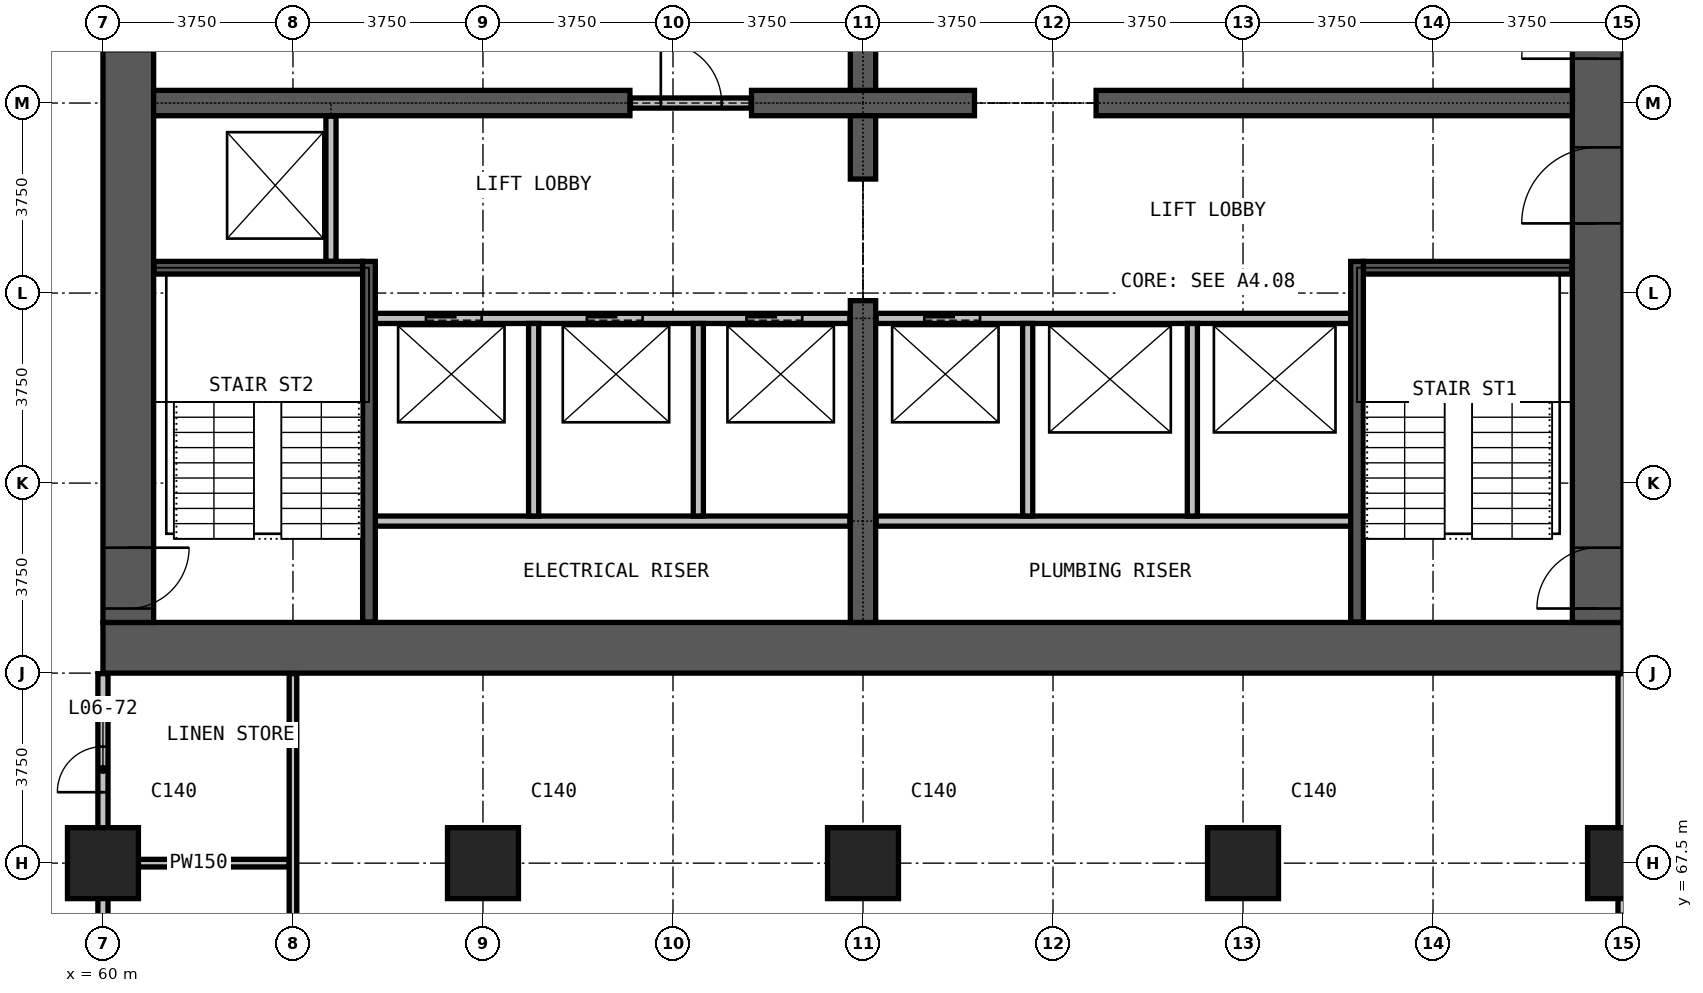
"""IFC4 building model, lengths in metres.
Left out: names, types, materials, properties, quantities, classifications, styles, units other than length and angle.
Written with IfcOpenShell. Run it as: python <this file> out.ifc"""

import sys

from ifc_helpers import new_model, si_unit, direction, frame, frame_2d, origin, origin_2d, place, context, subcontext, project, spatial, rectangle, extrude, element, fill, save


model = new_model("IFC4")
c1 = context("Model", 3, precision=1e-05, world=origin(), true_north=direction((0.0, 1.0)))
c2 = subcontext(c1, "Body", "Model", "MODEL_VIEW")
j1 = project(units=[si_unit("LENGTHUNIT", "METRE"), si_unit("PLANEANGLEUNIT", "RADIAN")], contexts=[c1])
p1 = place(None, origin())
s1 = spatial("IfcSite", under=j1, at=p1, CompositionType="ELEMENT")
p2 = place(p1, origin())
s2 = spatial("IfcBuilding", under=s1, at=p2, CompositionType="ELEMENT")
p3 = place(p2, frame((0.0, 0.0, 39.5)))
s3 = spatial("IfcBuildingStorey", under=s2, at=p3, CompositionType="ELEMENT", Elevation=39.5)
for number, where, z_axis, x_axis in (
    (1, (60.0, 67.5, 0.0), (0.0, 0.0, 1.0), (1.0, 0.0, 0.0)),
    (2, (67.5, 67.5, 0.0), (0.0, 0.0, 1.0), (1.0, 0.0, 0.0)),
    (3, (75.0, 67.5, 0.0), (0.0, 0.0, 1.0), (1.0, 0.0, 0.0)),
    (4, (82.5, 67.5, 0.0), (0.0, 0.0, 1.0), (1.0, 0.0, 0.0)),
    (5, (90.0, 67.5, 0.0), (0.0, 0.0, 1.0), (1.0, 0.0, 0.0)),
):
    element("IfcColumn", number, at=place(p3, frame(where, z_axis=z_axis, x_axis=x_axis)), inside=s3, PredefinedType="COLUMN", context=c2, shape_type="SweptSolid", body=[
        extrude(rectangle(XDim=1.4, YDim=1.4, at=origin_2d()), origin(), (0.0, 0.0, 1.0), 3.3),
    ])
p4 = place(p3, frame((60.0, 71.75, 0.0), z_axis=(0.0, 0.0, 1.0), x_axis=(1.0, 0.0, 0.0)))
e6 = element("IfcWall", 6, at=p4, inside=s3, PredefinedType="SHEAR", context=c2, shape_type="SweptSolid", body=[
    extrude(rectangle(XDim=30.0, YDim=1.0, at=frame_2d((15.0, 0.0))), origin(), (0.0, 0.0, 1.0), 3.3),
])
p5 = place(p3, frame((89.5, 72.25, 0.0), z_axis=(0.0, 0.0, 1.0), x_axis=(0.0, 1.0, 0.0)))
e7 = element("IfcWall", 7, at=p5, inside=s3, PredefinedType="SHEAR", context=c2, shape_type="SweptSolid", body=[
    extrude(rectangle(XDim=20.5, YDim=1.0, at=frame_2d((10.25, 0.0))), origin(), (0.0, 0.0, 1.0), 3.3),
])
p6 = place(p5, frame((0.275, 0.0, 0.0)))
e8 = element("IfcOpeningElement", 8, at=p6, cuts=e7, PredefinedType="OPENING", context=c2, shape_type="SweptSolid", body=[
    extrude(rectangle(XDim=1.2, YDim=2.2, at=frame_2d((0.6, 1.1))), frame((0.0, 0.51, 0.0), z_axis=(0.0, -1.0, 0.0), x_axis=(1.0, 0.0, 0.0)), (0.0, 0.0, 1.0), 1.02),
])
p7 = place(p5, frame((13.775, 0.0, 0.0)))
e9 = element("IfcOpeningElement", 9, at=p7, cuts=e7, PredefinedType="OPENING", context=c2, shape_type="SweptSolid", body=[
    extrude(rectangle(XDim=1.2, YDim=2.2, at=frame_2d((0.6, 1.1))), frame((0.0, 0.51, 0.0), z_axis=(0.0, -1.0, 0.0), x_axis=(1.0, 0.0, 0.0)), (0.0, 0.0, 1.0), 1.02),
])
p8 = place(p5, frame((7.875, 0.0, 0.0)))
e10 = element("IfcOpeningElement", 10, at=p8, cuts=e7, PredefinedType="OPENING", context=c2, shape_type="SweptSolid", body=[
    extrude(rectangle(XDim=1.5, YDim=2.2, at=frame_2d((0.75, 1.1))), frame((0.0, 0.51, 0.0), z_axis=(0.0, -1.0, 0.0), x_axis=(1.0, 0.0, 0.0)), (0.0, 0.0, 1.0), 1.02),
])
p9 = place(p5, frame((11.125, 0.0, 0.0)))
e11 = element("IfcOpeningElement", 11, at=p9, cuts=e7, PredefinedType="OPENING", context=c2, shape_type="SweptSolid", body=[
    extrude(rectangle(XDim=1.5, YDim=2.2, at=frame_2d((0.75, 1.1))), frame((0.0, 0.51, 0.0), z_axis=(0.0, -1.0, 0.0), x_axis=(1.0, 0.0, 0.0)), (0.0, 0.0, 1.0), 1.02),
])
p10 = place(p3, frame((60.5, 92.75, 0.0), z_axis=(0.0, 0.0, 1.0), x_axis=(0.0, -1.0, 0.0)))
e12 = element("IfcWall", 12, at=p10, inside=s3, PredefinedType="SHEAR", context=c2, shape_type="SweptSolid", body=[
    extrude(rectangle(XDim=20.5, YDim=1.0, at=frame_2d((10.25, 0.0))), origin(), (0.0, 0.0, 1.0), 3.3),
])
p11 = place(p10, frame((19.025, 0.0, 0.0)))
e13 = element("IfcOpeningElement", 13, at=p11, cuts=e12, PredefinedType="OPENING", context=c2, shape_type="SweptSolid", body=[
    extrude(rectangle(XDim=1.2, YDim=2.2, at=frame_2d((0.6, 1.1))), frame((0.0, 0.51, 0.0), z_axis=(0.0, -1.0, 0.0), x_axis=(1.0, 0.0, 0.0)), (0.0, 0.0, 1.0), 1.02),
])
p12 = place(p10, frame((8.025, 0.0, 0.0)))
e14 = element("IfcOpeningElement", 14, at=p12, cuts=e12, PredefinedType="OPENING", context=c2, shape_type="SweptSolid", body=[
    extrude(rectangle(XDim=1.2, YDim=2.2, at=frame_2d((0.6, 1.1))), frame((0.0, 0.51, 0.0), z_axis=(0.0, -1.0, 0.0), x_axis=(1.0, 0.0, 0.0)), (0.0, 0.0, 1.0), 1.02),
])
p13 = place(p3, frame((61.0, 82.5, 0.0), z_axis=(0.0, 0.0, 1.0), x_axis=(1.0, 0.0, 0.0)))
e15 = element("IfcWall", 15, at=p13, inside=s3, PredefinedType="SHEAR", context=c2, shape_type="SweptSolid", body=[
    extrude(rectangle(XDim=9.4, YDim=0.5, at=frame_2d((4.7, 0.0))), origin(), (0.0, 0.0, 1.0), 3.3),
])
p14 = place(p3, frame((72.8, 82.5, 0.0), z_axis=(0.0, 0.0, 1.0), x_axis=(1.0, 0.0, 0.0)))
e16 = element("IfcWall", 16, at=p14, inside=s3, PredefinedType="SHEAR", context=c2, shape_type="SweptSolid", body=[
    extrude(rectangle(XDim=4.4, YDim=0.5, at=frame_2d((2.2, 0.0))), origin(), (0.0, 0.0, 1.0), 3.3),
])
p15 = place(p3, frame((79.6, 82.5, 0.0), z_axis=(0.0, 0.0, 1.0), x_axis=(1.0, 0.0, 0.0)))
e17 = element("IfcWall", 17, at=p15, inside=s3, PredefinedType="SHEAR", context=c2, shape_type="SweptSolid", body=[
    extrude(rectangle(XDim=9.4, YDim=0.5, at=frame_2d((4.7, 0.0))), origin(), (0.0, 0.0, 1.0), 3.3),
])
p16 = place(p3, frame((75.0, 72.25, 0.0), z_axis=(0.0, 0.0, 1.0), x_axis=(0.0, 1.0, 0.0)))
e18 = element("IfcWall", 18, at=p16, inside=s3, PredefinedType="SHEAR", context=c2, shape_type="SweptSolid", body=[
    extrude(rectangle(XDim=6.35, YDim=0.5, at=frame_2d((3.175, 0.0))), origin(), (0.0, 0.0, 1.0), 3.3),
])
for number, where, z_axis, x_axis in (
    (19, (75.0, 81.0, 0.0), (0.0, 0.0, 1.0), (0.0, 1.0, 0.0)),
    (20, (75.0, 82.75, 0.0), (0.0, 0.0, 1.0), (0.0, 1.0, 0.0)),
):
    element("IfcWall", number, at=place(p3, frame(where, z_axis=z_axis, x_axis=x_axis)), inside=s3, PredefinedType="SHEAR", context=c2, shape_type="SweptSolid", body=[
        extrude(rectangle(XDim=1.25, YDim=0.5, at=frame_2d((0.625, 0.0))), origin(), (0.0, 0.0, 1.0), 3.3),
    ])
p17 = place(p3, frame((70.41, 82.5, 0.0), z_axis=(0.0, 0.0, 1.0), x_axis=(1.0, 0.0, 0.0)))
e21 = element("IfcWall", 21, at=p17, inside=s3, PredefinedType="PARTITIONING", context=c2, shape_type="SweptSolid", body=[
    extrude(rectangle(XDim=2.38, YDim=0.2, at=frame_2d((1.19, 0.0))), origin(), (0.0, 0.0, 1.0), 2.4),
])
p18 = place(p17, frame((0.6, 0.0, 0.0)))
e22 = element("IfcOpeningElement", 22, at=p18, cuts=e21, PredefinedType="OPENING", context=c2, shape_type="SweptSolid", body=[
    extrude(rectangle(XDim=1.2, YDim=2.2, at=frame_2d((0.6, 1.1))), frame((0.0, 0.11, 0.0), z_axis=(0.0, -1.0, 0.0), x_axis=(1.0, 0.0, 0.0)), (0.0, 0.0, 1.0), 0.22),
])
p19 = place(p3, frame((60.0, 52.4, 0.0), z_axis=(0.0, 0.0, 1.0), x_axis=(0.0, 1.0, 0.0)))
e23 = element("IfcWall", 23, at=p19, inside=s3, PredefinedType="PARTITIONING", context=c2, shape_type="SweptSolid", body=[
    extrude(rectangle(XDim=18.84, YDim=0.2, at=frame_2d((9.42, 0.0))), origin(), (0.0, 0.0, 1.0), 3.0),
])
p20 = place(p19, frame((3.35, 0.0, 0.0)))
e24 = element("IfcOpeningElement", 24, at=p20, cuts=e23, PredefinedType="OPENING", context=c2, shape_type="SweptSolid", body=[
    extrude(rectangle(XDim=1.0, YDim=2.2, at=frame_2d((0.5, 1.1))), frame((0.0, 0.11, 0.0), z_axis=(0.0, -1.0, 0.0), x_axis=(1.0, 0.0, 0.0)), (0.0, 0.0, 1.0), 0.22),
])
p21 = place(p19, frame((10.9, 0.0, 0.0)))
e25 = element("IfcOpeningElement", 25, at=p21, cuts=e23, PredefinedType="OPENING", context=c2, shape_type="SweptSolid", body=[
    extrude(rectangle(XDim=0.9, YDim=2.2, at=frame_2d((0.45, 1.1))), frame((0.0, 0.11, 0.0), z_axis=(0.0, -1.0, 0.0), x_axis=(1.0, 0.0, 0.0)), (0.0, 0.0, 1.0), 0.22),
])
p22 = place(p19, frame((16.5, 0.0, 0.0)))
e26 = element("IfcOpeningElement", 26, at=p22, cuts=e23, PredefinedType="OPENING", context=c2, shape_type="SweptSolid", body=[
    extrude(rectangle(XDim=0.9, YDim=2.2, at=frame_2d((0.45, 1.1))), frame((0.0, 0.11, 0.0), z_axis=(0.0, -1.0, 0.0), x_axis=(1.0, 0.0, 0.0)), (0.0, 0.0, 1.0), 0.22),
])
p23 = place(p3, frame((90.0, 52.4, 0.0), z_axis=(0.0, 0.0, 1.0), x_axis=(0.0, 1.0, 0.0)))
e27 = element("IfcWall", 27, at=p23, inside=s3, PredefinedType="PARTITIONING", context=c2, shape_type="SweptSolid", body=[
    extrude(rectangle(XDim=18.84, YDim=0.2, at=frame_2d((9.42, 0.0))), origin(), (0.0, 0.0, 1.0), 3.0),
])
p24 = place(p23, frame((3.35, 0.0, 0.0)))
e28 = element("IfcOpeningElement", 28, at=p24, cuts=e27, PredefinedType="OPENING", context=c2, shape_type="SweptSolid", body=[
    extrude(rectangle(XDim=1.0, YDim=2.2, at=frame_2d((0.5, 1.1))), frame((0.0, 0.11, 0.0), z_axis=(0.0, -1.0, 0.0), x_axis=(1.0, 0.0, 0.0)), (0.0, 0.0, 1.0), 0.22),
])
p25 = place(p23, frame((12.3, 0.0, 0.0)))
e29 = element("IfcOpeningElement", 29, at=p25, cuts=e27, PredefinedType="OPENING", context=c2, shape_type="SweptSolid", body=[
    extrude(rectangle(XDim=1.8, YDim=2.2, at=frame_2d((0.9, 1.1))), frame((0.0, 0.11, 0.0), z_axis=(0.0, -1.0, 0.0), x_axis=(1.0, 0.0, 0.0)), (0.0, 0.0, 1.0), 0.22),
])
p26 = place(p3, frame((60.1, 67.5, 0.0), z_axis=(0.0, 0.0, 1.0), x_axis=(1.0, 0.0, 0.0)))
e30 = element("IfcWall", 30, at=p26, inside=s3, PredefinedType="PARTITIONING", context=c2, shape_type="SweptSolid", body=[
    extrude(rectangle(XDim=3.575, YDim=0.15, at=frame_2d((1.788, 0.0))), origin(), (0.0, 0.0, 1.0), 3.0),
])
p27 = place(p3, frame((63.75, 60.075, 0.0), z_axis=(0.0, 0.0, 1.0), x_axis=(0.0, 1.0, 0.0)))
e31 = element("IfcWall", 31, at=p27, inside=s3, PredefinedType="PARTITIONING", context=c2, shape_type="SweptSolid", body=[
    extrude(rectangle(XDim=11.165, YDim=0.15, at=frame_2d((5.583, 0.0))), origin(), (0.0, 0.0, 1.0), 3.0),
])
for number, where, z_axis, x_axis in (
    (32, (65.375, 74.25, 0.0), (0.0, 0.0, 1.0), (1.0, 0.0, 0.0)),
    (33, (75.26, 74.25, 0.0), (0.0, 0.0, 1.0), (1.0, 0.0, 0.0)),
):
    element("IfcWall", number, at=place(p3, frame(where, z_axis=z_axis, x_axis=x_axis)), inside=s3, PredefinedType="PARTITIONING", context=c2, shape_type="SweptSolid", body=[
        extrude(rectangle(XDim=9.365, YDim=0.2, at=frame_2d((4.683, 0.0))), origin(), (0.0, 0.0, 1.0), 3.0),
    ])
p28 = place(p3, frame((65.375, 78.25, 0.0), z_axis=(0.0, 0.0, 1.0), x_axis=(1.0, 0.0, 0.0)))
e34 = element("IfcWall", 34, at=p28, inside=s3, PredefinedType="PARTITIONING", context=c2, shape_type="SweptSolid", body=[
    extrude(rectangle(XDim=9.365, YDim=0.2, at=frame_2d((4.683, 0.0))), origin(), (0.0, 0.0, 1.0), 3.0),
])
p29 = place(p28, frame((1.0, 0.0, 0.0)))
e35 = element("IfcOpeningElement", 35, at=p29, cuts=e34, PredefinedType="OPENING", context=c2, shape_type="SweptSolid", body=[
    extrude(rectangle(XDim=1.1, YDim=2.2, at=frame_2d((0.55, 1.1))), frame((0.0, 0.11, 0.0), z_axis=(0.0, -1.0, 0.0), x_axis=(1.0, 0.0, 0.0)), (0.0, 0.0, 1.0), 0.22),
])
p30 = place(p28, frame((4.175, 0.0, 0.0)))
e36 = element("IfcOpeningElement", 36, at=p30, cuts=e34, PredefinedType="OPENING", context=c2, shape_type="SweptSolid", body=[
    extrude(rectangle(XDim=1.1, YDim=2.2, at=frame_2d((0.55, 1.1))), frame((0.0, 0.11, 0.0), z_axis=(0.0, -1.0, 0.0), x_axis=(1.0, 0.0, 0.0)), (0.0, 0.0, 1.0), 0.22),
])
p31 = place(p28, frame((7.325, 0.0, 0.0)))
e37 = element("IfcOpeningElement", 37, at=p31, cuts=e34, PredefinedType="OPENING", context=c2, shape_type="SweptSolid", body=[
    extrude(rectangle(XDim=1.1, YDim=2.2, at=frame_2d((0.55, 1.1))), frame((0.0, 0.11, 0.0), z_axis=(0.0, -1.0, 0.0), x_axis=(1.0, 0.0, 0.0)), (0.0, 0.0, 1.0), 0.22),
])
p32 = place(p3, frame((75.26, 78.25, 0.0), z_axis=(0.0, 0.0, 1.0), x_axis=(1.0, 0.0, 0.0)))
e38 = element("IfcWall", 38, at=p32, inside=s3, PredefinedType="PARTITIONING", context=c2, shape_type="SweptSolid", body=[
    extrude(rectangle(XDim=9.365, YDim=0.2, at=frame_2d((4.683, 0.0))), origin(), (0.0, 0.0, 1.0), 3.0),
])
p33 = place(p32, frame((0.95, 0.0, 0.0)))
e39 = element("IfcOpeningElement", 39, at=p33, cuts=e38, PredefinedType="OPENING", context=c2, shape_type="SweptSolid", body=[
    extrude(rectangle(XDim=1.1, YDim=2.2, at=frame_2d((0.55, 1.1))), frame((0.0, 0.11, 0.0), z_axis=(0.0, -1.0, 0.0), x_axis=(1.0, 0.0, 0.0)), (0.0, 0.0, 1.0), 0.22),
])
p34 = place(p3, frame((64.5, 79.375, 0.0), z_axis=(0.0, 0.0, 1.0), x_axis=(0.0, 1.0, 0.0)))
e40 = element("IfcWall", 40, at=p34, inside=s3, PredefinedType="PARTITIONING", context=c2, shape_type="SweptSolid", body=[
    extrude(rectangle(XDim=2.865, YDim=0.2, at=frame_2d((1.433, 0.0))), origin(), (0.0, 0.0, 1.0), 3.0),
])
for number, where, z_axis, x_axis in (
    (41, (68.5, 74.35, 0.0), (0.0, 0.0, 1.0), (0.0, 1.0, 0.0)),
    (42, (71.75, 74.35, 0.0), (0.0, 0.0, 1.0), (0.0, 1.0, 0.0)),
    (43, (78.25, 74.35, 0.0), (0.0, 0.0, 1.0), (0.0, 1.0, 0.0)),
    (44, (81.5, 74.35, 0.0), (0.0, 0.0, 1.0), (0.0, 1.0, 0.0)),
):
    element("IfcWall", number, at=place(p3, frame(where, z_axis=z_axis, x_axis=x_axis)), inside=s3, PredefinedType="PARTITIONING", context=c2, shape_type="SweptSolid", body=[
        extrude(rectangle(XDim=3.8, YDim=0.2, at=frame_2d((1.9, 0.0))), origin(), (0.0, 0.0, 1.0), 3.0),
    ])
for number, where, z_axis, x_axis in (
    (45, (61.01, 79.25, 0.0), (0.0, 0.0, 1.0), (1.0, 0.0, 0.0)),
    (46, (84.875, 79.25, 0.0), (0.0, 0.0, 1.0), (1.0, 0.0, 0.0)),
):
    element("IfcWall", number, at=place(p3, frame(where, z_axis=z_axis, x_axis=x_axis)), inside=s3, PredefinedType="PARTITIONING", context=c2, shape_type="SweptSolid", body=[
        extrude(rectangle(XDim=4.115, YDim=0.25, at=frame_2d((2.058, 0.0))), origin(), (0.0, 0.0, 1.0), 3.0),
    ])
for number, where, z_axis, x_axis in (
    (47, (65.25, 72.26, 0.0), (0.0, 0.0, 1.0), (0.0, 1.0, 0.0)),
    (48, (84.75, 72.26, 0.0), (0.0, 0.0, 1.0), (0.0, 1.0, 0.0)),
):
    element("IfcWall", number, at=place(p3, frame(where, z_axis=z_axis, x_axis=x_axis)), inside=s3, PredefinedType="PARTITIONING", context=c2, shape_type="SweptSolid", body=[
        extrude(rectangle(XDim=7.115, YDim=0.25, at=frame_2d((3.558, 0.0))), origin(), (0.0, 0.0, 1.0), 3.0),
    ])
p35 = place(p29, origin())
e49 = element("IfcDoor", 49, at=p35, inside=s3, OperationType="DOUBLE_DOOR_SLIDING", PredefinedType="DOOR", context=c2, shape_type="SweptSolid", body=[
    extrude(rectangle(XDim=1.1, YDim=2.2, at=frame_2d((0.55, 1.1))), frame((0.0, 0.025, 0.0), z_axis=(0.0, -1.0, 0.0), x_axis=(1.0, 0.0, 0.0)), (0.0, 0.0, 1.0), 0.05),
])
fill(e35, e49)
p36 = place(p30, origin())
e50 = element("IfcDoor", 50, at=p36, inside=s3, OperationType="DOUBLE_DOOR_SLIDING", PredefinedType="DOOR", context=c2, shape_type="SweptSolid", body=[
    extrude(rectangle(XDim=1.1, YDim=2.2, at=frame_2d((0.55, 1.1))), frame((0.0, 0.025, 0.0), z_axis=(0.0, -1.0, 0.0), x_axis=(1.0, 0.0, 0.0)), (0.0, 0.0, 1.0), 0.05),
])
fill(e36, e50)
p37 = place(p31, origin())
e51 = element("IfcDoor", 51, at=p37, inside=s3, OperationType="DOUBLE_DOOR_SLIDING", PredefinedType="DOOR", context=c2, shape_type="SweptSolid", body=[
    extrude(rectangle(XDim=1.1, YDim=2.2, at=frame_2d((0.55, 1.1))), frame((0.0, 0.025, 0.0), z_axis=(0.0, -1.0, 0.0), x_axis=(1.0, 0.0, 0.0)), (0.0, 0.0, 1.0), 0.05),
])
fill(e37, e51)
p38 = place(p33, origin())
e52 = element("IfcDoor", 52, at=p38, inside=s3, OperationType="DOUBLE_DOOR_SLIDING", PredefinedType="DOOR", context=c2, shape_type="SweptSolid", body=[
    extrude(rectangle(XDim=1.1, YDim=2.2, at=frame_2d((0.55, 1.1))), frame((0.0, 0.025, 0.0), z_axis=(0.0, -1.0, 0.0), x_axis=(1.0, 0.0, 0.0)), (0.0, 0.0, 1.0), 0.05),
])
fill(e39, e52)
p39 = place(p18, origin())
e53 = element("IfcDoor", 53, at=p39, inside=s3, OperationType="SINGLE_SWING_LEFT", PredefinedType="DOOR", context=c2, shape_type="SweptSolid", body=[
    extrude(rectangle(XDim=1.2, YDim=2.2, at=frame_2d((0.6, 1.1))), frame((0.0, 0.025, 0.0), z_axis=(0.0, -1.0, 0.0), x_axis=(1.0, 0.0, 0.0)), (0.0, 0.0, 1.0), 0.05),
])
fill(e22, e53)
p40 = place(p6, origin())
e54 = element("IfcDoor", 54, at=p40, inside=s3, OperationType="SINGLE_SWING_RIGHT", PredefinedType="DOOR", context=c2, shape_type="SweptSolid", body=[
    extrude(rectangle(XDim=1.2, YDim=2.2, at=frame_2d((0.6, 1.1))), frame((0.0, 0.025, 0.0), z_axis=(0.0, -1.0, 0.0), x_axis=(1.0, 0.0, 0.0)), (0.0, 0.0, 1.0), 0.05),
])
fill(e8, e54)
p41 = place(p11, origin())
e55 = element("IfcDoor", 55, at=p41, inside=s3, OperationType="SINGLE_SWING_LEFT", PredefinedType="DOOR", context=c2, shape_type="SweptSolid", body=[
    extrude(rectangle(XDim=1.2, YDim=2.2, at=frame_2d((0.6, 1.1))), frame((0.0, 0.025, 0.0), z_axis=(0.0, -1.0, 0.0), x_axis=(1.0, 0.0, 0.0)), (0.0, 0.0, 1.0), 0.05),
])
fill(e13, e55)
p42 = place(p8, origin())
e56 = element("IfcDoor", 56, at=p42, inside=s3, OperationType="DOUBLE_DOOR_SINGLE_SWING", PredefinedType="DOOR", context=c2, shape_type="SweptSolid", body=[
    extrude(rectangle(XDim=1.5, YDim=2.2, at=frame_2d((0.75, 1.1))), frame((0.0, 0.025, 0.0), z_axis=(0.0, -1.0, 0.0), x_axis=(1.0, 0.0, 0.0)), (0.0, 0.0, 1.0), 0.05),
])
fill(e10, e56)
p43 = place(p9, origin())
e57 = element("IfcDoor", 57, at=p43, inside=s3, OperationType="DOUBLE_DOOR_SINGLE_SWING", PredefinedType="DOOR", context=c2, shape_type="SweptSolid", body=[
    extrude(rectangle(XDim=1.5, YDim=2.2, at=frame_2d((0.75, 1.1))), frame((0.0, 0.025, 0.0), z_axis=(0.0, -1.0, 0.0), x_axis=(1.0, 0.0, 0.0)), (0.0, 0.0, 1.0), 0.05),
])
fill(e11, e57)
p44 = place(p22, origin())
e58 = element("IfcDoor", 58, at=p44, inside=s3, OperationType="SINGLE_SWING_RIGHT", PredefinedType="DOOR", context=c2, shape_type="SweptSolid", body=[
    extrude(rectangle(XDim=0.9, YDim=2.2, at=frame_2d((0.45, 1.1))), frame((0.0, 0.025, 0.0), z_axis=(0.0, -1.0, 0.0), x_axis=(1.0, 0.0, 0.0)), (0.0, 0.0, 1.0), 0.05),
])
fill(e26, e58)
save(model, sys.argv[1])
